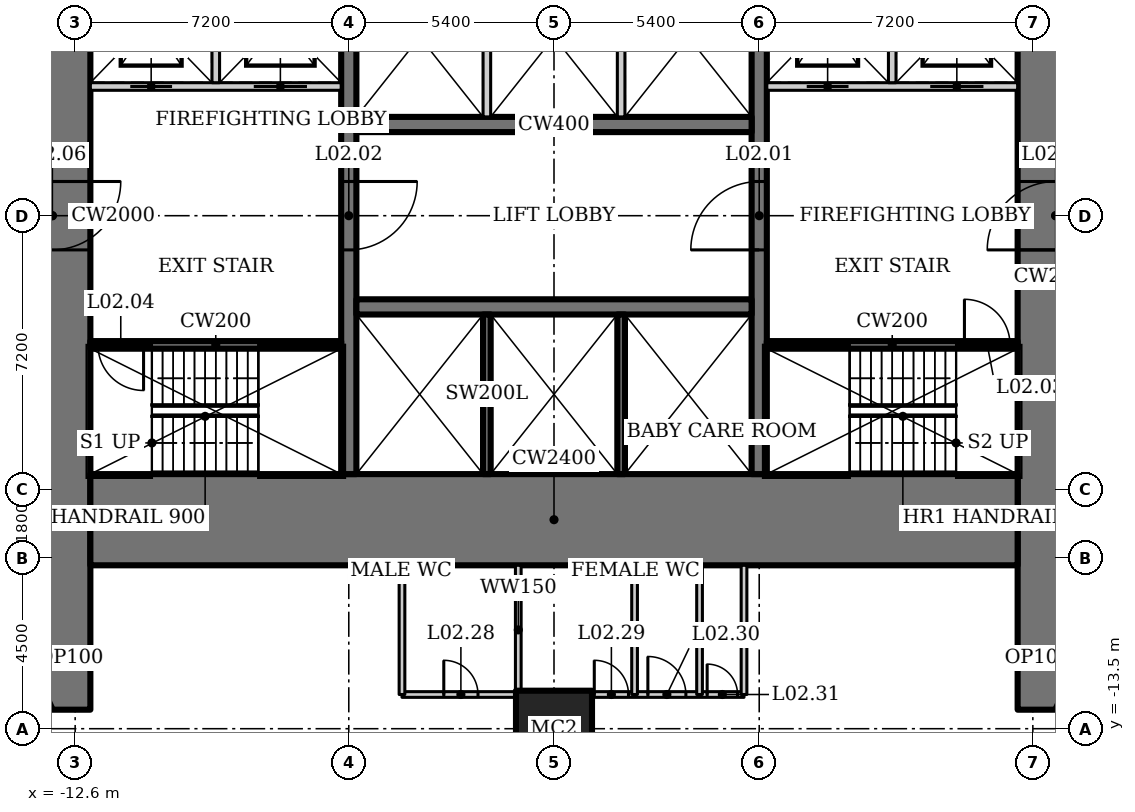
"""IFC4 building model, lengths in metres.
Left out: names, types, materials, properties, quantities, classifications, styles, units other than length and angle.
Written with IfcOpenShell. Run it as: python <this file> out.ifc"""

import sys

from ifc_helpers import new_model, si_unit, direction, frame, frame_2d, origin, origin_2d, place, context, subcontext, project, spatial, rectangle, hollow_rectangle, extrude, element, fill, save


model = new_model("IFC4")
c1 = context("Model", 3, precision=1e-05, world=origin(), true_north=direction((0.0, 1.0)))
c2 = subcontext(c1, "Body", "Model", "MODEL_VIEW")
j1 = project(units=[si_unit("LENGTHUNIT", "METRE"), si_unit("PLANEANGLEUNIT", "RADIAN")], contexts=[c1])
p1 = place(None, origin())
s1 = spatial("IfcSite", under=j1, at=p1, CompositionType="ELEMENT")
p2 = place(p1, origin())
s2 = spatial("IfcBuilding", under=s1, at=p2, CompositionType="ELEMENT")
p3 = place(p2, frame((0.0, 0.0, 14.5)))
s3 = spatial("IfcBuildingStorey", under=s2, at=p3, CompositionType="ELEMENT", Elevation=14.5)
p4 = place(p3, frame((0.0, -13.5, 0.0), z_axis=(0.0, 0.0, 1.0), x_axis=(1.0, 0.0, 0.0)))
e1 = element("IfcColumn", 1, at=p4, inside=s3, PredefinedType="COLUMN", context=c2, shape_type="SweptSolid", body=[
    extrude(hollow_rectangle(XDim=2.0, YDim=2.0, WallThickness=0.17, at=origin_2d()), origin(), (0.0, 0.0, 1.0), 7.5),
])
p5 = place(p3, frame((13.2, -13.0, 0.0), z_axis=(0.0, 0.0, 1.0), x_axis=(0.0, 1.0, 0.0)))
e2 = element("IfcWall", 2, at=p5, inside=s3, PredefinedType="SHEAR", context=c2, shape_type="SweptSolid", body=[
    extrude(rectangle(XDim=26.0, YDim=2.0, at=frame_2d((13.0, 0.0))), origin(), (0.0, 0.0, 1.0), 7.5),
])
p6 = place(p5, frame((12.1, 0.0, 0.0)))
e3 = element("IfcOpeningElement", 3, at=p6, cuts=e2, PredefinedType="OPENING", context=c2, shape_type="SweptSolid", body=[
    extrude(rectangle(XDim=1.8, YDim=2.1, at=frame_2d((0.9, 1.05))), frame((0.0, 1.01, 0.0), z_axis=(0.0, -1.0, 0.0), x_axis=(1.0, 0.0, 0.0)), (0.0, 0.0, 1.0), 2.02),
])
p7 = place(p3, frame((-13.2, 13.0, 0.0), z_axis=(0.0, 0.0, 1.0), x_axis=(0.0, -1.0, 0.0)))
e4 = element("IfcWall", 4, at=p7, inside=s3, PredefinedType="SHEAR", context=c2, shape_type="SweptSolid", body=[
    extrude(rectangle(XDim=26.0, YDim=2.0, at=frame_2d((13.0, 0.0))), origin(), (0.0, 0.0, 1.0), 7.5),
])
p8 = place(p7, frame((12.1, 0.0, 0.0)))
e5 = element("IfcOpeningElement", 5, at=p8, cuts=e4, PredefinedType="OPENING", context=c2, shape_type="SweptSolid", body=[
    extrude(rectangle(XDim=1.8, YDim=2.1, at=frame_2d((0.9, 1.05))), frame((0.0, 1.01, 0.0), z_axis=(0.0, -1.0, 0.0), x_axis=(1.0, 0.0, 0.0)), (0.0, 0.0, 1.0), 2.02),
])
p9 = place(p3, frame((-12.2, -8.0, 0.0), z_axis=(0.0, 0.0, 1.0), x_axis=(1.0, 0.0, 0.0)))
e6 = element("IfcWall", 6, at=p9, inside=s3, PredefinedType="SHEAR", context=c2, shape_type="SweptSolid", body=[
    extrude(rectangle(XDim=24.4, YDim=2.4, at=frame_2d((12.2, 0.0))), origin(), (0.0, 0.0, 1.0), 7.5),
])
p10 = place(p3, frame((5.4, -6.8, 0.0), z_axis=(0.0, 0.0, 1.0), x_axis=(0.0, 1.0, 0.0)))
e7 = element("IfcWall", 7, at=p10, inside=s3, PredefinedType="SHEAR", context=c2, shape_type="SweptSolid", body=[
    extrude(rectangle(XDim=13.6, YDim=0.4, at=frame_2d((6.8, 0.0))), origin(), (0.0, 0.0, 1.0), 7.5),
])
p11 = place(p10, frame((5.9, 0.0, 0.0)))
e8 = element("IfcOpeningElement", 8, at=p11, cuts=e7, PredefinedType="OPENING", context=c2, shape_type="SweptSolid", body=[
    extrude(rectangle(XDim=1.8, YDim=2.1, at=frame_2d((0.9, 1.05))), frame((0.0, 0.21, 0.0), z_axis=(0.0, -1.0, 0.0), x_axis=(1.0, 0.0, 0.0)), (0.0, 0.0, 1.0), 0.42),
])
p12 = place(p3, frame((-5.4, 6.8, 0.0), z_axis=(0.0, 0.0, 1.0), x_axis=(0.0, -1.0, 0.0)))
e9 = element("IfcWall", 9, at=p12, inside=s3, PredefinedType="SHEAR", context=c2, shape_type="SweptSolid", body=[
    extrude(rectangle(XDim=13.6, YDim=0.4, at=frame_2d((6.8, 0.0))), origin(), (0.0, 0.0, 1.0), 7.5),
])
p13 = place(p12, frame((5.9, 0.0, 0.0)))
e10 = element("IfcOpeningElement", 10, at=p13, cuts=e9, PredefinedType="OPENING", context=c2, shape_type="SweptSolid", body=[
    extrude(rectangle(XDim=1.8, YDim=2.1, at=frame_2d((0.9, 1.05))), frame((0.0, 0.21, 0.0), z_axis=(0.0, -1.0, 0.0), x_axis=(1.0, 0.0, 0.0)), (0.0, 0.0, 1.0), 0.42),
])
p14 = place(p3, frame((-5.2, -2.4, 0.0), z_axis=(0.0, 0.0, 1.0), x_axis=(1.0, 0.0, 0.0)))
e11 = element("IfcWall", 11, at=p14, inside=s3, PredefinedType="SHEAR", context=c2, shape_type="SweptSolid", body=[
    extrude(rectangle(XDim=10.4, YDim=0.4, at=frame_2d((5.2, 0.0))), origin(), (0.0, 0.0, 1.0), 7.5),
])
for number, where, z_axis, x_axis in (
    (12, (-1.767, -2.6, 0.0), (0.0, 0.0, 1.0), (0.0, -1.0, 0.0)),
    (13, (1.767, -2.6, 0.0), (0.0, 0.0, 1.0), (0.0, -1.0, 0.0)),
):
    element("IfcWall", number, at=place(p3, frame(where, z_axis=z_axis, x_axis=x_axis)), inside=s3, PredefinedType="SOLIDWALL", context=c2, shape_type="SweptSolid", body=[
        extrude(rectangle(XDim=4.2, YDim=0.2, at=frame_2d((2.1, 0.0))), origin(), (0.0, 0.0, 1.0), 7.5),
    ])
p15 = place(p3, frame((5.2, 2.4, 0.0), z_axis=(0.0, 0.0, 1.0), x_axis=(-1.0, 0.0, 0.0)))
e14 = element("IfcWall", 14, at=p15, inside=s3, PredefinedType="SHEAR", context=c2, shape_type="SweptSolid", body=[
    extrude(rectangle(XDim=10.4, YDim=0.4, at=frame_2d((5.2, 0.0))), origin(), (0.0, 0.0, 1.0), 7.5),
])
for number, where, z_axis, x_axis in (
    (15, (-1.767, 2.6, 0.0), (0.0, 0.0, 1.0), (0.0, 1.0, 0.0)),
    (16, (1.767, 2.6, 0.0), (0.0, 0.0, 1.0), (0.0, 1.0, 0.0)),
):
    element("IfcWall", number, at=place(p3, frame(where, z_axis=z_axis, x_axis=x_axis)), inside=s3, PredefinedType="SOLIDWALL", context=c2, shape_type="SweptSolid", body=[
        extrude(rectangle(XDim=4.2, YDim=0.2, at=frame_2d((2.1, 0.0))), origin(), (0.0, 0.0, 1.0), 7.5),
    ])
p16 = place(p3, frame((5.6, -3.4, 0.0), z_axis=(0.0, 0.0, 1.0), x_axis=(1.0, 0.0, 0.0)))
e17 = element("IfcWall", 17, at=p16, inside=s3, PredefinedType="SHEAR", context=c2, shape_type="SweptSolid", body=[
    extrude(rectangle(XDim=6.6, YDim=0.2, at=frame_2d((3.3, 0.0))), origin(), (0.0, 0.0, 1.0), 7.5),
])
p17 = place(p16, frame((5.2, 0.0, 0.0)))
e18 = element("IfcOpeningElement", 18, at=p17, cuts=e17, PredefinedType="OPENING", context=c2, shape_type="SweptSolid", body=[
    extrude(rectangle(XDim=1.2, YDim=2.1, at=frame_2d((0.6, 1.05))), frame((0.0, 0.11, 0.0), z_axis=(0.0, -1.0, 0.0), x_axis=(1.0, 0.0, 0.0)), (0.0, 0.0, 1.0), 0.22),
])
p18 = place(p3, frame((12.2, 3.4, 0.0), z_axis=(0.0, 0.0, 1.0), x_axis=(-1.0, 0.0, 0.0)))
e19 = element("IfcWall", 19, at=p18, inside=s3, PredefinedType="SOLIDWALL", context=c2, shape_type="SweptSolid", body=[
    extrude(rectangle(XDim=6.6, YDim=0.2, at=frame_2d((3.3, 0.0))), origin(), (0.0, 0.0, 1.0), 7.5),
])
p19 = place(p18, frame((4.45, 0.0, 0.0)))
e20 = element("IfcOpeningElement", 20, at=p19, cuts=e19, PredefinedType="OPENING", context=c2, shape_type="SweptSolid", body=[
    extrude(rectangle(XDim=1.1, YDim=2.2, at=frame_2d((0.55, 1.1))), frame((0.0, 0.11, 0.0), z_axis=(0.0, -1.0, 0.0), x_axis=(1.0, 0.0, 0.0)), (0.0, 0.0, 1.0), 0.22),
])
p20 = place(p18, frame((0.9, 0.0, 0.0)))
e21 = element("IfcOpeningElement", 21, at=p20, cuts=e19, PredefinedType="OPENING", context=c2, shape_type="SweptSolid", body=[
    extrude(rectangle(XDim=1.4, YDim=2.2, at=frame_2d((0.7, 1.1))), frame((0.0, 0.11, 0.0), z_axis=(0.0, -1.0, 0.0), x_axis=(1.0, 0.0, 0.0)), (0.0, 0.0, 1.0), 0.22),
])
p21 = place(p3, frame((8.9, 3.5, 0.0), z_axis=(0.0, 0.0, 1.0), x_axis=(0.0, 1.0, 0.0)))
e22 = element("IfcWall", 22, at=p21, inside=s3, PredefinedType="SOLIDWALL", context=c2, shape_type="SweptSolid", body=[
    extrude(rectangle(XDim=3.3, YDim=0.2, at=frame_2d((1.65, 0.0))), origin(), (0.0, 0.0, 1.0), 7.5),
])
p22 = place(p3, frame((-5.6, -3.4, 0.0), z_axis=(0.0, 0.0, 1.0), x_axis=(-1.0, 0.0, 0.0)))
e23 = element("IfcWall", 23, at=p22, inside=s3, PredefinedType="SHEAR", context=c2, shape_type="SweptSolid", body=[
    extrude(rectangle(XDim=6.6, YDim=0.2, at=frame_2d((3.3, 0.0))), origin(), (0.0, 0.0, 1.0), 7.5),
])
p23 = place(p22, frame((5.2, 0.0, 0.0)))
e24 = element("IfcOpeningElement", 24, at=p23, cuts=e23, PredefinedType="OPENING", context=c2, shape_type="SweptSolid", body=[
    extrude(rectangle(XDim=1.2, YDim=2.1, at=frame_2d((0.6, 1.05))), frame((0.0, 0.11, 0.0), z_axis=(0.0, -1.0, 0.0), x_axis=(1.0, 0.0, 0.0)), (0.0, 0.0, 1.0), 0.22),
])
p24 = place(p3, frame((-12.2, 3.4, 0.0), z_axis=(0.0, 0.0, 1.0), x_axis=(1.0, 0.0, 0.0)))
e25 = element("IfcWall", 25, at=p24, inside=s3, PredefinedType="SOLIDWALL", context=c2, shape_type="SweptSolid", body=[
    extrude(rectangle(XDim=6.6, YDim=0.2, at=frame_2d((3.3, 0.0))), origin(), (0.0, 0.0, 1.0), 7.5),
])
p25 = place(p24, frame((1.05, 0.0, 0.0)))
e26 = element("IfcOpeningElement", 26, at=p25, cuts=e25, PredefinedType="OPENING", context=c2, shape_type="SweptSolid", body=[
    extrude(rectangle(XDim=1.1, YDim=2.2, at=frame_2d((0.55, 1.1))), frame((0.0, 0.11, 0.0), z_axis=(0.0, -1.0, 0.0), x_axis=(1.0, 0.0, 0.0)), (0.0, 0.0, 1.0), 0.22),
])
p26 = place(p24, frame((4.3, 0.0, 0.0)))
e27 = element("IfcOpeningElement", 27, at=p26, cuts=e25, PredefinedType="OPENING", context=c2, shape_type="SweptSolid", body=[
    extrude(rectangle(XDim=1.4, YDim=2.2, at=frame_2d((0.7, 1.1))), frame((0.0, 0.11, 0.0), z_axis=(0.0, -1.0, 0.0), x_axis=(1.0, 0.0, 0.0)), (0.0, 0.0, 1.0), 0.22),
])
p27 = place(p3, frame((-8.9, 3.5, 0.0), z_axis=(0.0, 0.0, 1.0), x_axis=(0.0, 1.0, 0.0)))
e28 = element("IfcWall", 28, at=p27, inside=s3, PredefinedType="SOLIDWALL", context=c2, shape_type="SweptSolid", body=[
    extrude(rectangle(XDim=3.3, YDim=0.2, at=frame_2d((1.65, 0.0))), origin(), (0.0, 0.0, 1.0), 7.5),
])
p28 = place(p3, frame((-4.0, -12.6, 0.0), z_axis=(0.0, 0.0, 1.0), x_axis=(1.0, 0.0, 0.0)))
e29 = element("IfcWall", 29, at=p28, inside=s3, PredefinedType="SOLIDWALL", context=c2, shape_type="SweptSolid", body=[
    extrude(rectangle(XDim=9.0, YDim=0.15, at=frame_2d((4.5, 0.0))), origin(), (0.0, 0.0, 1.0), 7.3),
])
p29 = place(p28, frame((1.1, 0.0, 0.0)))
e30 = element("IfcOpeningElement", 30, at=p29, cuts=e29, PredefinedType="OPENING", context=c2, shape_type="SweptSolid", body=[
    extrude(rectangle(XDim=0.9, YDim=2.1, at=frame_2d((0.45, 1.05))), frame((0.0, 0.085, 0.0), z_axis=(0.0, -1.0, 0.0), x_axis=(1.0, 0.0, 0.0)), (0.0, 0.0, 1.0), 0.17),
])
p30 = place(p28, frame((5.06, 0.0, 0.0)))
e31 = element("IfcOpeningElement", 31, at=p30, cuts=e29, PredefinedType="OPENING", context=c2, shape_type="SweptSolid", body=[
    extrude(rectangle(XDim=0.9, YDim=2.1, at=frame_2d((0.45, 1.05))), frame((0.0, 0.085, 0.0), z_axis=(0.0, -1.0, 0.0), x_axis=(1.0, 0.0, 0.0)), (0.0, 0.0, 1.0), 0.17),
])
p31 = place(p28, frame((6.47, 0.0, 0.0)))
e32 = element("IfcOpeningElement", 32, at=p31, cuts=e29, PredefinedType="OPENING", context=c2, shape_type="SweptSolid", body=[
    extrude(rectangle(XDim=1.0, YDim=2.1, at=frame_2d((0.5, 1.05))), frame((0.0, 0.085, 0.0), z_axis=(0.0, -1.0, 0.0), x_axis=(1.0, 0.0, 0.0)), (0.0, 0.0, 1.0), 0.17),
])
p32 = place(p28, frame((8.03, 0.0, 0.0)))
e33 = element("IfcOpeningElement", 33, at=p32, cuts=e29, PredefinedType="OPENING", context=c2, shape_type="SweptSolid", body=[
    extrude(rectangle(XDim=0.8, YDim=2.1, at=frame_2d((0.4, 1.05))), frame((0.0, 0.085, 0.0), z_axis=(0.0, -1.0, 0.0), x_axis=(1.0, 0.0, 0.0)), (0.0, 0.0, 1.0), 0.17),
])
for number, where, z_axis, x_axis in (
    (34, (-4.0, -9.2, 0.0), (0.0, 0.0, 1.0), (0.0, -1.0, 0.0)),
    (35, (5.0, -9.2, 0.0), (0.0, 0.0, 1.0), (0.0, -1.0, 0.0)),
    (36, (-0.94, -9.2, 0.0), (0.0, 0.0, 1.0), (0.0, -1.0, 0.0)),
):
    element("IfcWall", number, at=place(p3, frame(where, z_axis=z_axis, x_axis=x_axis)), inside=s3, PredefinedType="SOLIDWALL", context=c2, shape_type="SweptSolid", body=[
        extrude(rectangle(XDim=3.4, YDim=0.15, at=frame_2d((1.7, 0.0))), origin(), (0.0, 0.0, 1.0), 7.3),
    ])
p33 = place(p3, frame((2.12, -9.2, 0.0), z_axis=(0.0, 0.0, 1.0), x_axis=(0.0, -1.0, 0.0)))
e37 = element("IfcWall", 37, at=p33, inside=s3, PredefinedType="SOLIDWALL", context=c2, shape_type="SweptSolid", body=[
    extrude(rectangle(XDim=3.4, YDim=0.15, at=frame_2d((1.7, 0.0))), origin(), (0.0, 0.0, 1.0), 6.53),
])
p34 = place(p3, frame((3.83, -9.2, 0.0), z_axis=(0.0, 0.0, 1.0), x_axis=(0.0, -1.0, 0.0)))
e38 = element("IfcWall", 38, at=p34, inside=s3, PredefinedType="SOLIDWALL", context=c2, shape_type="SweptSolid", body=[
    extrude(rectangle(XDim=3.4, YDim=0.15, at=frame_2d((1.7, 0.0))), origin(), (0.0, 0.0, 1.0), 7.3),
])
for number, where, z_axis, x_axis in (
    (39, (13.2, -13.0, 0.0), (0.0, 0.0, 1.0), (0.42, 0.907, 0.0)),
    (40, (-13.2, -13.0, 0.0), (0.0, 0.0, 1.0), (-0.42, 0.907, 0.0)),
):
    element("IfcWall", number, at=place(p3, frame(where, z_axis=z_axis, x_axis=x_axis)), inside=s3, PredefinedType="PARTITIONING", context=c2, shape_type="SweptSolid", body=[
        extrude(rectangle(XDim=2.975, YDim=0.1, at=frame_2d((1.488, 0.0))), origin(), (0.0, 0.0, 1.0), 7.3),
    ])
p35 = place(p11, origin())
e41 = element("IfcDoor", 41, at=p35, inside=s3, OperationType="DOUBLE_DOOR_DOUBLE_SWING", PredefinedType="DOOR", context=c2, shape_type="SweptSolid", body=[
    extrude(rectangle(XDim=1.8, YDim=2.1, at=frame_2d((0.9, 1.05))), frame((0.0, 0.025, 0.0), z_axis=(0.0, -1.0, 0.0), x_axis=(1.0, 0.0, 0.0)), (0.0, 0.0, 1.0), 0.05),
])
fill(e8, e41)
p36 = place(p13, origin())
e42 = element("IfcDoor", 42, at=p36, inside=s3, OperationType="DOUBLE_DOOR_DOUBLE_SWING", PredefinedType="DOOR", context=c2, shape_type="SweptSolid", body=[
    extrude(rectangle(XDim=1.8, YDim=2.1, at=frame_2d((0.9, 1.05))), frame((0.0, 0.025, 0.0), z_axis=(0.0, -1.0, 0.0), x_axis=(1.0, 0.0, 0.0)), (0.0, 0.0, 1.0), 0.05),
])
fill(e10, e42)
p37 = place(p17, origin())
e43 = element("IfcDoor", 43, at=p37, inside=s3, OperationType="SINGLE_SWING_RIGHT", PredefinedType="DOOR", context=c2, shape_type="SweptSolid", body=[
    extrude(rectangle(XDim=1.2, YDim=2.1, at=frame_2d((0.6, 1.05))), frame((0.0, 0.025, 0.0), z_axis=(0.0, -1.0, 0.0), x_axis=(1.0, 0.0, 0.0)), (0.0, 0.0, 1.0), 0.05),
])
fill(e18, e43)
p38 = place(p23, origin())
e44 = element("IfcDoor", 44, at=p38, inside=s3, OperationType="SINGLE_SWING_RIGHT", PredefinedType="DOOR", context=c2, shape_type="SweptSolid", body=[
    extrude(rectangle(XDim=1.2, YDim=2.1, at=frame_2d((0.6, 1.05))), frame((0.0, 0.025, 0.0), z_axis=(0.0, -1.0, 0.0), x_axis=(1.0, 0.0, 0.0)), (0.0, 0.0, 1.0), 0.05),
])
fill(e24, e44)
p39 = place(p6, origin())
e45 = element("IfcDoor", 45, at=p39, inside=s3, OperationType="DOUBLE_DOOR_DOUBLE_SWING", PredefinedType="DOOR", context=c2, shape_type="SweptSolid", body=[
    extrude(rectangle(XDim=1.8, YDim=2.1, at=frame_2d((0.9, 1.05))), frame((0.0, 0.025, 0.0), z_axis=(0.0, -1.0, 0.0), x_axis=(1.0, 0.0, 0.0)), (0.0, 0.0, 1.0), 0.05),
])
fill(e3, e45)
p40 = place(p8, origin())
e46 = element("IfcDoor", 46, at=p40, inside=s3, OperationType="DOUBLE_DOOR_DOUBLE_SWING", PredefinedType="DOOR", context=c2, shape_type="SweptSolid", body=[
    extrude(rectangle(XDim=1.8, YDim=2.1, at=frame_2d((0.9, 1.05))), frame((0.0, 0.025, 0.0), z_axis=(0.0, -1.0, 0.0), x_axis=(1.0, 0.0, 0.0)), (0.0, 0.0, 1.0), 0.05),
])
fill(e5, e46)
p41 = place(p25, origin())
e47 = element("IfcDoor", 47, at=p41, inside=s3, OperationType="DOUBLE_DOOR_SLIDING", PredefinedType="DOOR", context=c2, shape_type="SweptSolid", body=[
    extrude(rectangle(XDim=1.1, YDim=2.2, at=frame_2d((0.55, 1.1))), frame((0.0, 0.025, 0.0), z_axis=(0.0, -1.0, 0.0), x_axis=(1.0, 0.0, 0.0)), (0.0, 0.0, 1.0), 0.05),
])
fill(e26, e47)
p42 = place(p26, origin())
e48 = element("IfcDoor", 48, at=p42, inside=s3, OperationType="DOUBLE_DOOR_SLIDING", PredefinedType="DOOR", context=c2, shape_type="SweptSolid", body=[
    extrude(rectangle(XDim=1.4, YDim=2.2, at=frame_2d((0.7, 1.1))), frame((0.0, 0.025, 0.0), z_axis=(0.0, -1.0, 0.0), x_axis=(1.0, 0.0, 0.0)), (0.0, 0.0, 1.0), 0.05),
])
fill(e27, e48)
p43 = place(p19, origin())
e49 = element("IfcDoor", 49, at=p43, inside=s3, OperationType="DOUBLE_DOOR_SLIDING", PredefinedType="DOOR", context=c2, shape_type="SweptSolid", body=[
    extrude(rectangle(XDim=1.1, YDim=2.2, at=frame_2d((0.55, 1.1))), frame((0.0, 0.025, 0.0), z_axis=(0.0, -1.0, 0.0), x_axis=(1.0, 0.0, 0.0)), (0.0, 0.0, 1.0), 0.05),
])
fill(e20, e49)
p44 = place(p20, origin())
e50 = element("IfcDoor", 50, at=p44, inside=s3, OperationType="DOUBLE_DOOR_SLIDING", PredefinedType="DOOR", context=c2, shape_type="SweptSolid", body=[
    extrude(rectangle(XDim=1.4, YDim=2.2, at=frame_2d((0.7, 1.1))), frame((0.0, 0.025, 0.0), z_axis=(0.0, -1.0, 0.0), x_axis=(1.0, 0.0, 0.0)), (0.0, 0.0, 1.0), 0.05),
])
fill(e21, e50)
p45 = place(p29, origin())
e51 = element("IfcDoor", 51, at=p45, inside=s3, OperationType="SINGLE_SWING_LEFT", PredefinedType="DOOR", context=c2, shape_type="SweptSolid", body=[
    extrude(rectangle(XDim=0.9, YDim=2.1, at=frame_2d((0.45, 1.05))), frame((0.0, 0.025, 0.0), z_axis=(0.0, -1.0, 0.0), x_axis=(1.0, 0.0, 0.0)), (0.0, 0.0, 1.0), 0.05),
])
fill(e30, e51)
p46 = place(p30, origin())
e52 = element("IfcDoor", 52, at=p46, inside=s3, OperationType="SINGLE_SWING_LEFT", PredefinedType="DOOR", context=c2, shape_type="SweptSolid", body=[
    extrude(rectangle(XDim=0.9, YDim=2.1, at=frame_2d((0.45, 1.05))), frame((0.0, 0.025, 0.0), z_axis=(0.0, -1.0, 0.0), x_axis=(1.0, 0.0, 0.0)), (0.0, 0.0, 1.0), 0.05),
])
fill(e31, e52)
p47 = place(p31, origin())
e53 = element("IfcDoor", 53, at=p47, inside=s3, OperationType="SINGLE_SWING_LEFT", PredefinedType="DOOR", context=c2, shape_type="SweptSolid", body=[
    extrude(rectangle(XDim=1.0, YDim=2.1, at=frame_2d((0.5, 1.05))), frame((0.0, 0.025, 0.0), z_axis=(0.0, -1.0, 0.0), x_axis=(1.0, 0.0, 0.0)), (0.0, 0.0, 1.0), 0.05),
])
fill(e32, e53)
p48 = place(p32, origin())
e54 = element("IfcDoor", 54, at=p48, inside=s3, OperationType="SINGLE_SWING_LEFT", PredefinedType="DOOR", context=c2, shape_type="SweptSolid", body=[
    extrude(rectangle(XDim=0.8, YDim=2.1, at=frame_2d((0.4, 1.05))), frame((0.0, 0.025, 0.0), z_axis=(0.0, -1.0, 0.0), x_axis=(1.0, 0.0, 0.0)), (0.0, 0.0, 1.0), 0.05),
])
fill(e33, e54)
save(model, sys.argv[1])
